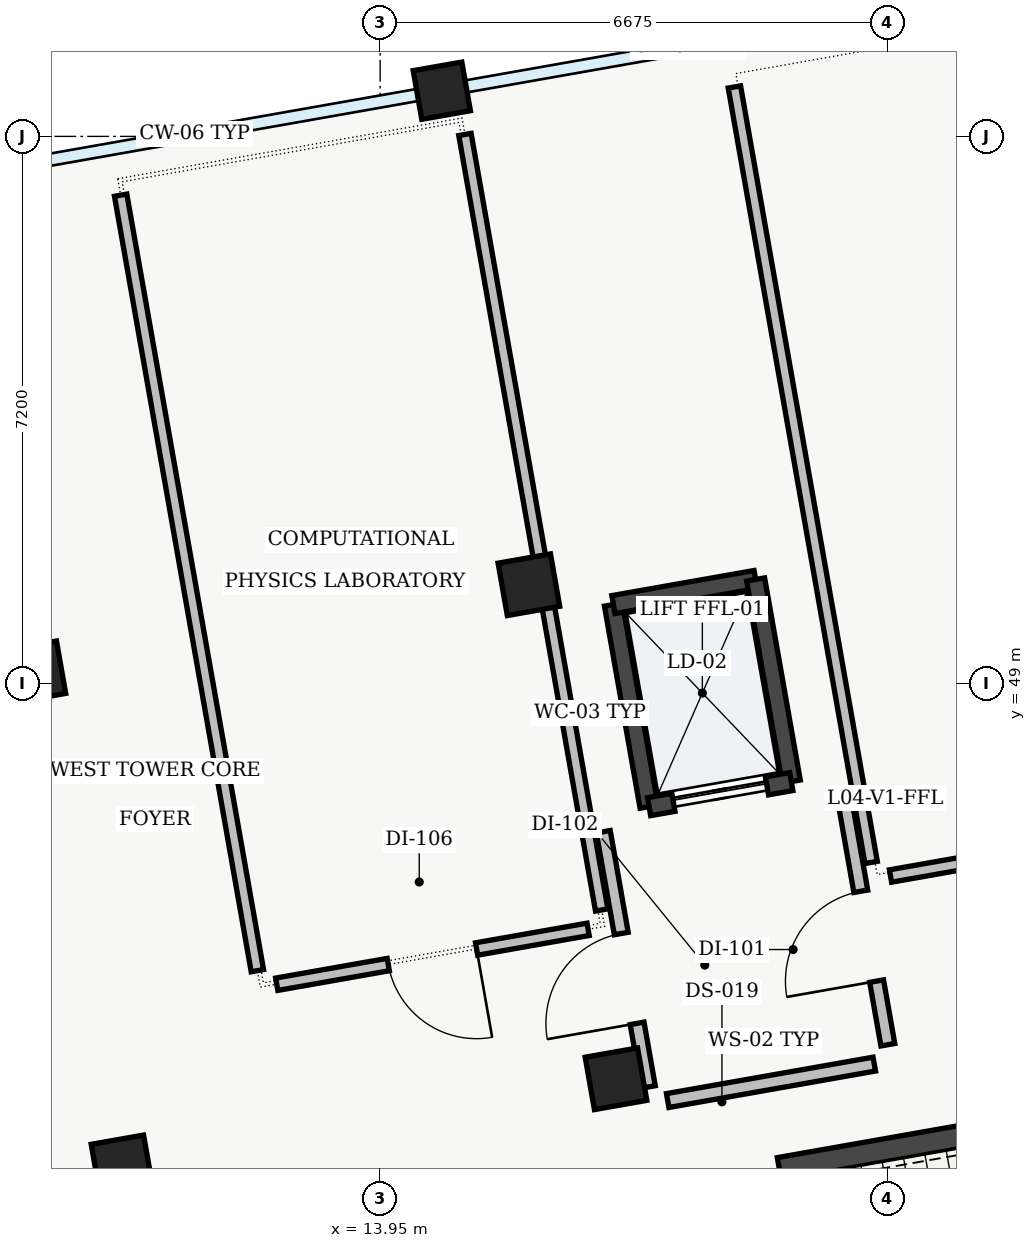
"""IFC4 building model, lengths in metres.
Left out: names, types, materials, properties, quantities, classifications, styles, units other than length and angle.
Written with IfcOpenShell. Run it as: python <this file> out.ifc"""

import sys

from ifc_helpers import new_model, si_unit, direction, frame, frame_2d, origin, origin_2d, place, context, subcontext, project, spatial, rectangle, extrude, element, fill, save


model = new_model("IFC4")
c1 = context("Model", 3, precision=1e-05, world=origin(), true_north=direction((0.0, 1.0)))
c2 = subcontext(c1, "Body", "Model", "MODEL_VIEW")
j1 = project(units=[si_unit("LENGTHUNIT", "METRE"), si_unit("PLANEANGLEUNIT", "RADIAN")], contexts=[c1])
p1 = place(None, origin())
s1 = spatial("IfcSite", under=j1, at=p1, CompositionType="ELEMENT")
p2 = place(p1, origin())
s2 = spatial("IfcBuilding", under=s1, at=p2, CompositionType="ELEMENT")
p3 = place(p2, frame((0.0, 0.0, 18.6)))
s3 = spatial("IfcBuildingStorey", under=s2, at=p3, CompositionType="ELEMENT", Elevation=18.6)
for number, where, z_axis, x_axis in (
    (1, (10.554, 42.656, 0.0), (0.0, 0.0, 1.0), (0.985, 0.174, 0.0)),
    (2, (9.407, 49.156, 0.0), (0.0, 0.0, 1.0), (0.985, 0.174, 0.0)),
    (3, (17.053, 43.802, 0.0), (0.0, 0.0, 1.0), (0.985, 0.174, 0.0)),
    (4, (15.907, 50.302, 0.0), (0.0, 0.0, 1.0), (0.985, 0.174, 0.0)),
):
    element("IfcColumn", number, at=place(p3, frame(where, z_axis=z_axis, x_axis=x_axis)), inside=s3, PredefinedType="COLUMN", context=c2, shape_type="SweptSolid", body=[
        extrude(rectangle(XDim=0.7, YDim=0.7, at=origin_2d()), origin(), (0.0, 0.0, 1.0), 4.32),
    ])
p4 = place(p3, frame((14.761, 56.801, 0.0), z_axis=(0.0, 0.0, 1.0), x_axis=(0.984807753012, 0.173648177667, 0.0)))
e5 = element("IfcColumn", 5, at=p4, inside=s3, PredefinedType="COLUMN", context=c2, shape_type="SweptSolid", body=[
    extrude(rectangle(XDim=0.65, YDim=0.65, at=origin_2d()), origin(), (0.0, 0.0, 1.0), 4.32),
])
p5 = place(p3, frame((17.863, 42.381, 0.0), z_axis=(0.0, 0.0, 1.0), x_axis=(0.984808225754, 0.173645496596, 0.0)))
e6 = element("IfcWall", 6, at=p5, inside=s3, PredefinedType="SHEAR", context=c2, shape_type="SweptSolid", body=[
    extrude(rectangle(XDim=7.47, YDim=0.3, at=frame_2d((3.735, 0.0))), origin(), (0.0, 0.0, 1.0), 4.28),
])
p6 = place(p5, frame((0.18, 0.0, 0.0)))
e7 = element("IfcOpeningElement", 7, at=p6, cuts=e6, PredefinedType="OPENING", context=c2, shape_type="SweptSolid", body=[
    extrude(rectangle(XDim=1.18, YDim=2.15, at=frame_2d((0.59, 1.075))), frame((0.0, 0.15, 0.0), z_axis=(0.0, -1.0, 0.0), x_axis=(1.0, 0.0, 0.0)), (0.0, 0.0, 1.0), 0.3),
])
p7 = place(p3, frame((17.488, 47.382, 0.0), z_axis=(0.0, 0.0, 1.0), x_axis=(-0.173615102578, 0.98481358447, 0.0)))
e8 = element("IfcWall", 8, at=p7, inside=s3, PredefinedType="SHEAR", context=c2, shape_type="SweptSolid", body=[
    extrude(rectangle(XDim=2.7, YDim=0.24, at=frame_2d((1.35, 0.0))), origin(), (0.0, 0.0, 1.0), 4.28),
])
p8 = place(p3, frame((17.02, 50.041, 0.0), z_axis=(0.0, 0.0, 1.0), x_axis=(0.984815882103, 0.173602068988, 0.0)))
e9 = element("IfcWall", 9, at=p8, inside=s3, PredefinedType="SHEAR", context=c2, shape_type="SweptSolid", body=[
    extrude(rectangle(XDim=1.9, YDim=0.24, at=frame_2d((0.95, 0.0))), origin(), (0.0, 0.0, 1.0), 4.28),
])
p9 = place(p3, frame((18.891, 50.371, 0.0), z_axis=(0.0, 0.0, 1.0), x_axis=(0.173615102578, -0.98481358447, 0.0)))
e10 = element("IfcWall", 10, at=p9, inside=s3, PredefinedType="SHEAR", context=c2, shape_type="SweptSolid", body=[
    extrude(rectangle(XDim=2.7, YDim=0.24, at=frame_2d((1.35, 0.0))), origin(), (0.0, 0.0, 1.0), 4.28),
])
p10 = place(p3, frame((19.359, 47.712, 0.0), z_axis=(0.0, 0.0, 1.0), x_axis=(-0.984815882103, -0.173602068988, 0.0)))
e11 = element("IfcWall", 11, at=p10, inside=s3, PredefinedType="SHEAR", context=c2, shape_type="SweptSolid", body=[
    extrude(rectangle(XDim=1.9, YDim=0.24, at=frame_2d((0.95, 0.0))), origin(), (0.0, 0.0, 1.0), 4.28),
])
p11 = place(p10, frame((0.325, 0.0, 0.0)))
e12 = element("IfcOpeningElement", 12, at=p11, cuts=e11, PredefinedType="OPENING", context=c2, shape_type="SweptSolid", body=[
    extrude(rectangle(XDim=1.25, YDim=2.2, at=frame_2d((0.625, 1.1))), frame((0.0, 0.12, 0.0), z_axis=(0.0, -1.0, 0.0), x_axis=(1.0, 0.0, 0.0)), (0.0, 0.0, 1.0), 0.24),
])
p12 = place(p3, frame((17.733, 43.516, 0.0), z_axis=(0.0, 0.0, 1.0), x_axis=(0.984808483292, 0.173644035992, 0.0)))
e13 = element("IfcWall", 13, at=p12, inside=s3, PredefinedType="SOLIDWALL", context=c2, shape_type="SweptSolid", body=[
    extrude(rectangle(XDim=2.76, YDim=0.185, at=frame_2d((1.38, 0.0))), origin(), (0.0, 0.0, 1.0), 3.95),
])
p13 = place(p3, frame((20.63, 44.25, 0.0), z_axis=(0.0, 0.0, 1.0), x_axis=(-0.173621956536, 0.984812376145, 0.0)))
e14 = element("IfcWall", 14, at=p13, inside=s3, PredefinedType="SOLIDWALL", context=c2, shape_type="SweptSolid", body=[
    extrude(rectangle(XDim=3.41, YDim=0.185, at=frame_2d((1.705, 0.0))), origin(), (0.0, 0.0, 1.0), 3.95),
])
p14 = place(p13, frame((0.85, 0.0, 0.0)))
e15 = element("IfcOpeningElement", 15, at=p14, cuts=e14, PredefinedType="OPENING", context=c2, shape_type="SweptSolid", body=[
    extrude(rectangle(XDim=1.2, YDim=2.15, at=frame_2d((0.6, 1.075))), frame((0.0, 0.093, 0.0), z_axis=(0.0, -1.0, 0.0), x_axis=(1.0, 0.0, 0.0)), (0.0, 0.0, 1.0), 0.185),
])
p15 = place(p3, frame((16.886, 47.052, 0.0), z_axis=(0.0, 0.0, 1.0), x_axis=(0.173621956536, -0.984812376145, 0.0)))
e16 = element("IfcWall", 16, at=p15, inside=s3, PredefinedType="SOLIDWALL", context=c2, shape_type="SweptSolid", body=[
    extrude(rectangle(XDim=3.41, YDim=0.185, at=frame_2d((1.705, 0.0))), origin(), (0.0, 0.0, 1.0), 3.95),
])
p16 = place(p15, frame((1.36, 0.0, 0.0)))
e17 = element("IfcOpeningElement", 17, at=p16, cuts=e16, PredefinedType="OPENING", context=c2, shape_type="SweptSolid", body=[
    extrude(rectangle(XDim=1.2, YDim=2.15, at=frame_2d((0.6, 1.075))), frame((0.0, 0.093, 0.0), z_axis=(0.0, -1.0, 0.0), x_axis=(1.0, 0.0, 0.0)), (0.0, 0.0, 1.0), 0.185),
])
p17 = place(p3, frame((12.59, 45.046, 0.0), z_axis=(0.0, 0.0, 1.0), x_axis=(0.984805411783, 0.173661454915, 0.0)))
e18 = element("IfcWall", 18, at=p17, inside=s3, PredefinedType="PARTITIONING", context=c2, shape_type="SweptSolid", body=[
    extrude(rectangle(XDim=4.16, YDim=0.165, at=frame_2d((2.08, 0.0))), origin(), (0.0, 0.0, 1.0), 3.95),
])
p18 = place(p17, frame((1.49, 0.0, 0.0)))
e19 = element("IfcOpeningElement", 19, at=p18, cuts=e18, PredefinedType="OPENING", context=c2, shape_type="SweptSolid", body=[
    extrude(rectangle(XDim=1.18, YDim=2.14, at=frame_2d((0.59, 1.07))), frame((0.0, 0.083, 0.0), z_axis=(0.0, -1.0, 0.0), x_axis=(1.0, 0.0, 0.0)), (0.0, 0.0, 1.0), 0.165),
])
p19 = place(p3, frame((16.865, 46.023, 0.0), z_axis=(0.0, 0.0, 1.0), x_axis=(-0.173632075677, 0.984810592092, 0.0)))
e20 = element("IfcWall", 20, at=p19, inside=s3, PredefinedType="PARTITIONING", context=c2, shape_type="SweptSolid", body=[
    extrude(rectangle(XDim=10.36, YDim=0.165, at=frame_2d((5.18, 0.0))), origin(), (0.0, 0.0, 1.0), 3.705),
])
p20 = place(p3, frame((10.536, 55.427, 0.0), z_axis=(0.0, 0.0, 1.0), x_axis=(0.173654930775, -0.984806562233, 0.0)))
e21 = element("IfcWall", 21, at=p20, inside=s3, PredefinedType="PARTITIONING", context=c2, shape_type="SweptSolid", body=[
    extrude(rectangle(XDim=10.36, YDim=0.165, at=frame_2d((5.18, 0.0))), origin(), (0.0, 0.0, 1.0), 3.95),
])
p21 = place(p3, frame((20.665, 46.469, 0.0), z_axis=(0.0, 0.0, 1.0), x_axis=(0.984808006729, 0.173646738761, 0.0)))
e22 = element("IfcWall", 22, at=p21, inside=s3, PredefinedType="PARTITIONING", context=c2, shape_type="SweptSolid", body=[
    extrude(rectangle(XDim=12.26, YDim=0.165, at=frame_2d((6.13, 0.0))), origin(), (0.0, 0.0, 1.0), 3.95),
])
p22 = place(p21, frame((5.525, 0.0, 0.0)))
e23 = element("IfcOpeningElement", 23, at=p22, cuts=e22, PredefinedType="OPENING", context=c2, shape_type="SweptSolid", body=[
    extrude(rectangle(XDim=1.21, YDim=2.16, at=frame_2d((0.605, 1.08))), frame((0.0, 0.083, 0.0), z_axis=(0.0, -1.0, 0.0), x_axis=(1.0, 0.0, 0.0)), (0.0, 0.0, 1.0), 0.165),
])
p23 = place(p3, frame((18.611, 56.851, 0.0), z_axis=(0.0, 0.0, 1.0), x_axis=(0.173654930775, -0.984806562233, 0.0)))
e24 = element("IfcWall", 24, at=p23, inside=s3, PredefinedType="PARTITIONING", context=c2, shape_type="SweptSolid", body=[
    extrude(rectangle(XDim=10.36, YDim=0.165, at=frame_2d((5.18, 0.0))), origin(), (0.0, 0.0, 1.0), 3.95),
])
p24 = place(p6, origin())
e25 = element("IfcDoor", 25, at=p24, inside=s3, OperationType="SINGLE_SWING_RIGHT", PredefinedType="DOOR", context=c2, shape_type="SweptSolid", body=[
    extrude(rectangle(XDim=1.18, YDim=2.15, at=frame_2d((0.59, 1.075))), frame((0.0, 0.025, 0.0), z_axis=(0.0, -1.0, 0.0), x_axis=(1.0, 0.0, 0.0)), (0.0, 0.0, 1.0), 0.05),
])
fill(e7, e25)
p25 = place(p11, origin())
e26 = element("IfcDoor", 26, at=p25, inside=s3, OperationType="SLIDING_TO_RIGHT", PredefinedType="DOOR", context=c2, shape_type="SweptSolid", body=[
    extrude(rectangle(XDim=1.25, YDim=2.2, at=frame_2d((0.625, 1.1))), frame((0.0, 0.025, 0.0), z_axis=(0.0, -1.0, 0.0), x_axis=(1.0, 0.0, 0.0)), (0.0, 0.0, 1.0), 0.05),
])
fill(e12, e26)
p26 = place(p14, origin())
e27 = element("IfcDoor", 27, at=p26, inside=s3, OperationType="SINGLE_SWING_LEFT", PredefinedType="DOOR", context=c2, shape_type="SweptSolid", body=[
    extrude(rectangle(XDim=1.2, YDim=2.15, at=frame_2d((0.6, 1.075))), frame((0.0, 0.025, 0.0), z_axis=(0.0, -1.0, 0.0), x_axis=(1.0, 0.0, 0.0)), (0.0, 0.0, 1.0), 0.05),
])
fill(e15, e27)
p27 = place(p16, origin())
e28 = element("IfcDoor", 28, at=p27, inside=s3, OperationType="SINGLE_SWING_RIGHT", PredefinedType="DOOR", context=c2, shape_type="SweptSolid", body=[
    extrude(rectangle(XDim=1.2, YDim=2.15, at=frame_2d((0.6, 1.075))), frame((0.0, 0.025, 0.0), z_axis=(0.0, -1.0, 0.0), x_axis=(1.0, 0.0, 0.0)), (0.0, 0.0, 1.0), 0.05),
])
fill(e17, e28)
p28 = place(p18, origin())
e29 = element("IfcDoor", 29, at=p28, inside=s3, OperationType="SINGLE_SWING_RIGHT", PredefinedType="DOOR", context=c2, shape_type="SweptSolid", body=[
    extrude(rectangle(XDim=1.18, YDim=2.14, at=frame_2d((0.59, 1.07))), frame((0.0, 0.025, 0.0), z_axis=(0.0, -1.0, 0.0), x_axis=(1.0, 0.0, 0.0)), (0.0, 0.0, 1.0), 0.05),
])
fill(e19, e29)
save(model, sys.argv[1])
